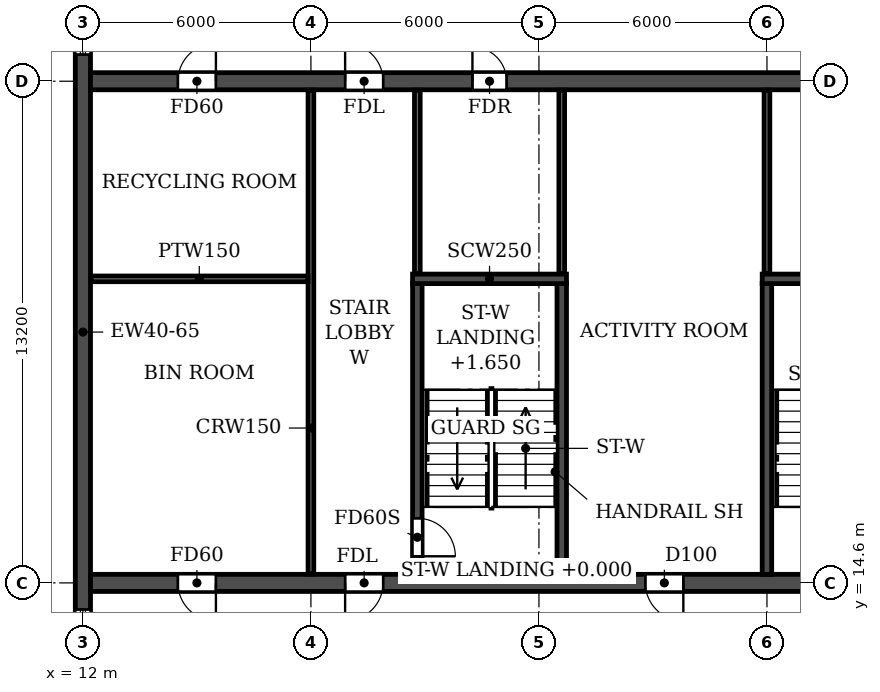
"""IFC4 building model, lengths in metres.
Left out: names, types, materials, properties, quantities, classifications, styles, units other than length and angle.
Written with IfcOpenShell. Run it as: python <this file> out.ifc"""

import sys

from ifc_helpers import new_model, si_unit, direction, frame, frame_2d, origin, place, context, subcontext, project, spatial, rectangle, extrude, element, fill, save


model = new_model("IFC4")
c1 = context("Model", 3, precision=1e-05, world=origin(), true_north=direction((0.0, 1.0)))
c2 = subcontext(c1, "Body", "Model", "MODEL_VIEW")
j1 = project(units=[si_unit("LENGTHUNIT", "METRE"), si_unit("PLANEANGLEUNIT", "RADIAN")], contexts=[c1])
p1 = place(None, origin())
s1 = spatial("IfcSite", under=j1, at=p1, CompositionType="ELEMENT")
p2 = place(p1, origin())
s2 = spatial("IfcBuilding", under=s1, at=p2, CompositionType="ELEMENT")
p3 = place(p2, frame((0.0, 0.0, 155.4)))
s3 = spatial("IfcBuildingStorey", under=s2, at=p3, CompositionType="ELEMENT", Elevation=155.4)
p4 = place(p3, frame((12.0, 4.683, 0.0), z_axis=(0.0, 0.0, 1.0), x_axis=(0.0, 1.0, 0.0)))
e1 = element("IfcWall", 1, at=p4, inside=s3, PredefinedType="SHEAR", context=c2, shape_type="SweptSolid", body=[
    extrude(rectangle(XDim=33.034, YDim=0.4, at=frame_2d((16.517, 0.0))), origin(), (0.0, 0.0, 1.0), 3.0),
])
p5 = place(p4, frame((23.817, 0.0, 0.9)))
e2 = element("IfcOpeningElement", 2, at=p5, cuts=e1, PredefinedType="OPENING", context=c2, shape_type="SweptSolid", body=[
    extrude(rectangle(XDim=1.2, YDim=1.5, at=frame_2d((0.6, 0.75))), frame((0.0, 0.21, 0.0), z_axis=(0.0, -1.0, 0.0), x_axis=(1.0, 0.0, 0.0)), (0.0, 0.0, 1.0), 0.42),
])
p6 = place(p4, frame((8.017, 0.0, 0.9)))
e3 = element("IfcOpeningElement", 3, at=p6, cuts=e1, PredefinedType="OPENING", context=c2, shape_type="SweptSolid", body=[
    extrude(rectangle(XDim=1.2, YDim=1.5, at=frame_2d((0.6, 0.75))), frame((0.0, 0.21, 0.0), z_axis=(0.0, -1.0, 0.0), x_axis=(1.0, 0.0, 0.0)), (0.0, 0.0, 1.0), 0.42),
])
p7 = place(p4, frame((28.293, 0.0, 0.6)))
e4 = element("IfcOpeningElement", 4, at=p7, cuts=e1, PredefinedType="OPENING", context=c2, shape_type="SweptSolid", body=[
    extrude(rectangle(XDim=2.2, YDim=1.8, at=frame_2d((1.1, 0.9))), frame((0.0, 0.21, 0.0), z_axis=(0.0, -1.0, 0.0), x_axis=(1.0, 0.0, 0.0)), (0.0, 0.0, 1.0), 0.42),
])
p8 = place(p4, frame((2.541, 0.0, 0.6)))
e5 = element("IfcOpeningElement", 5, at=p8, cuts=e1, PredefinedType="OPENING", context=c2, shape_type="SweptSolid", body=[
    extrude(rectangle(XDim=2.2, YDim=1.8, at=frame_2d((1.1, 0.9))), frame((0.0, 0.21, 0.0), z_axis=(0.0, -1.0, 0.0), x_axis=(1.0, 0.0, 0.0)), (0.0, 0.0, 1.0), 0.42),
])
p9 = place(p3, frame((12.2, 14.6, 0.0), z_axis=(0.0, 0.0, 1.0), x_axis=(1.0, 0.0, 0.0)))
e6 = element("IfcWall", 6, at=p9, inside=s3, PredefinedType="SOLIDWALL", context=c2, shape_type="SweptSolid", body=[
    extrude(rectangle(XDim=77.6, YDim=0.45, at=frame_2d((38.8, 0.0))), origin(), (0.0, 0.0, 1.0), 3.0),
])
p10 = place(p9, frame((2.3, 0.0, 0.0)))
e7 = element("IfcOpeningElement", 7, at=p10, cuts=e6, PredefinedType="OPENING", context=c2, shape_type="SweptSolid", body=[
    extrude(rectangle(XDim=1.0, YDim=2.1, at=frame_2d((0.5, 1.05))), frame((0.0, 0.235, 0.0), z_axis=(0.0, -1.0, 0.0), x_axis=(1.0, 0.0, 0.0)), (0.0, 0.0, 1.0), 0.47),
])
p11 = place(p9, frame((6.7, 0.0, 0.0)))
e8 = element("IfcOpeningElement", 8, at=p11, cuts=e6, PredefinedType="OPENING", context=c2, shape_type="SweptSolid", body=[
    extrude(rectangle(XDim=1.0, YDim=2.1, at=frame_2d((0.5, 1.05))), frame((0.0, 0.235, 0.0), z_axis=(0.0, -1.0, 0.0), x_axis=(1.0, 0.0, 0.0)), (0.0, 0.0, 1.0), 0.47),
])
p12 = place(p9, frame((14.6, 0.0, 0.0)))
e9 = element("IfcOpeningElement", 9, at=p12, cuts=e6, PredefinedType="OPENING", context=c2, shape_type="SweptSolid", body=[
    extrude(rectangle(XDim=1.0, YDim=2.1, at=frame_2d((0.5, 1.05))), frame((0.0, 0.235, 0.0), z_axis=(0.0, -1.0, 0.0), x_axis=(1.0, 0.0, 0.0)), (0.0, 0.0, 1.0), 0.47),
])
p13 = place(p9, frame((19.2, 0.0, 0.0)))
e10 = element("IfcOpeningElement", 10, at=p13, cuts=e6, PredefinedType="OPENING", context=c2, shape_type="SweptSolid", body=[
    extrude(rectangle(XDim=1.0, YDim=2.1, at=frame_2d((0.5, 1.05))), frame((0.0, 0.235, 0.0), z_axis=(0.0, -1.0, 0.0), x_axis=(1.0, 0.0, 0.0)), (0.0, 0.0, 1.0), 0.47),
])
p14 = place(p9, frame((30.5, 0.0, 0.0)))
e11 = element("IfcOpeningElement", 11, at=p14, cuts=e6, PredefinedType="OPENING", context=c2, shape_type="SweptSolid", body=[
    extrude(rectangle(XDim=1.0, YDim=2.1, at=frame_2d((0.5, 1.05))), frame((0.0, 0.235, 0.0), z_axis=(0.0, -1.0, 0.0), x_axis=(1.0, 0.0, 0.0)), (0.0, 0.0, 1.0), 0.47),
])
p15 = place(p9, frame((34.15, 0.0, 0.0)))
e12 = element("IfcOpeningElement", 12, at=p15, cuts=e6, PredefinedType="OPENING", context=c2, shape_type="SweptSolid", body=[
    extrude(rectangle(XDim=1.5, YDim=2.1, at=frame_2d((0.75, 1.05))), frame((0.0, 0.235, 0.0), z_axis=(0.0, -1.0, 0.0), x_axis=(1.0, 0.0, 0.0)), (0.0, 0.0, 1.0), 0.47),
])
p16 = place(p9, frame((38.3, 0.0, 0.0)))
e13 = element("IfcOpeningElement", 13, at=p16, cuts=e6, PredefinedType="OPENING", context=c2, shape_type="SweptSolid", body=[
    extrude(rectangle(XDim=1.0, YDim=2.1, at=frame_2d((0.5, 1.05))), frame((0.0, 0.235, 0.0), z_axis=(0.0, -1.0, 0.0), x_axis=(1.0, 0.0, 0.0)), (0.0, 0.0, 1.0), 0.47),
])
p17 = place(p9, frame((43.5, 0.0, 0.0)))
e14 = element("IfcOpeningElement", 14, at=p17, cuts=e6, PredefinedType="OPENING", context=c2, shape_type="SweptSolid", body=[
    extrude(rectangle(XDim=1.0, YDim=2.1, at=frame_2d((0.5, 1.05))), frame((0.0, 0.235, 0.0), z_axis=(0.0, -1.0, 0.0), x_axis=(1.0, 0.0, 0.0)), (0.0, 0.0, 1.0), 0.47),
])
p18 = place(p9, frame((57.4, 0.0, 0.0)))
e15 = element("IfcOpeningElement", 15, at=p18, cuts=e6, PredefinedType="OPENING", context=c2, shape_type="SweptSolid", body=[
    extrude(rectangle(XDim=1.0, YDim=2.1, at=frame_2d((0.5, 1.05))), frame((0.0, 0.235, 0.0), z_axis=(0.0, -1.0, 0.0), x_axis=(1.0, 0.0, 0.0)), (0.0, 0.0, 1.0), 0.47),
])
p19 = place(p9, frame((62.0, 0.0, 0.0)))
e16 = element("IfcOpeningElement", 16, at=p19, cuts=e6, PredefinedType="OPENING", context=c2, shape_type="SweptSolid", body=[
    extrude(rectangle(XDim=1.0, YDim=2.1, at=frame_2d((0.5, 1.05))), frame((0.0, 0.235, 0.0), z_axis=(0.0, -1.0, 0.0), x_axis=(1.0, 0.0, 0.0)), (0.0, 0.0, 1.0), 0.47),
])
p20 = place(p9, frame((69.9, 0.0, 0.0)))
e17 = element("IfcOpeningElement", 17, at=p20, cuts=e6, PredefinedType="OPENING", context=c2, shape_type="SweptSolid", body=[
    extrude(rectangle(XDim=1.0, YDim=2.1, at=frame_2d((0.5, 1.05))), frame((0.0, 0.235, 0.0), z_axis=(0.0, -1.0, 0.0), x_axis=(1.0, 0.0, 0.0)), (0.0, 0.0, 1.0), 0.47),
])
p21 = place(p9, frame((74.3, 0.0, 0.0)))
e18 = element("IfcOpeningElement", 18, at=p21, cuts=e6, PredefinedType="OPENING", context=c2, shape_type="SweptSolid", body=[
    extrude(rectangle(XDim=1.0, YDim=2.1, at=frame_2d((0.5, 1.05))), frame((0.0, 0.235, 0.0), z_axis=(0.0, -1.0, 0.0), x_axis=(1.0, 0.0, 0.0)), (0.0, 0.0, 1.0), 0.47),
])
p22 = place(p3, frame((12.2, 27.8, 0.0), z_axis=(0.0, 0.0, 1.0), x_axis=(1.0, 0.0, 0.0)))
e19 = element("IfcWall", 19, at=p22, inside=s3, PredefinedType="SOLIDWALL", context=c2, shape_type="SweptSolid", body=[
    extrude(rectangle(XDim=77.6, YDim=0.45, at=frame_2d((38.8, 0.0))), origin(), (0.0, 0.0, 1.0), 3.0),
])
p23 = place(p22, frame((2.3, 0.0, 0.0)))
e20 = element("IfcOpeningElement", 20, at=p23, cuts=e19, PredefinedType="OPENING", context=c2, shape_type="SweptSolid", body=[
    extrude(rectangle(XDim=1.0, YDim=2.1, at=frame_2d((0.5, 1.05))), frame((0.0, 0.235, 0.0), z_axis=(0.0, -1.0, 0.0), x_axis=(1.0, 0.0, 0.0)), (0.0, 0.0, 1.0), 0.47),
])
p24 = place(p22, frame((6.7, 0.0, 0.0)))
e21 = element("IfcOpeningElement", 21, at=p24, cuts=e19, PredefinedType="OPENING", context=c2, shape_type="SweptSolid", body=[
    extrude(rectangle(XDim=1.0, YDim=2.1, at=frame_2d((0.5, 1.05))), frame((0.0, 0.235, 0.0), z_axis=(0.0, -1.0, 0.0), x_axis=(1.0, 0.0, 0.0)), (0.0, 0.0, 1.0), 0.47),
])
p25 = place(p22, frame((10.05, 0.0, 0.0)))
e22 = element("IfcOpeningElement", 22, at=p25, cuts=e19, PredefinedType="OPENING", context=c2, shape_type="SweptSolid", body=[
    extrude(rectangle(XDim=0.9, YDim=2.1, at=frame_2d((0.45, 1.05))), frame((0.0, 0.235, 0.0), z_axis=(0.0, -1.0, 0.0), x_axis=(1.0, 0.0, 0.0)), (0.0, 0.0, 1.0), 0.47),
])
p26 = place(p22, frame((19.25, 0.0, 0.0)))
e23 = element("IfcOpeningElement", 23, at=p26, cuts=e19, PredefinedType="OPENING", context=c2, shape_type="SweptSolid", body=[
    extrude(rectangle(XDim=0.9, YDim=2.1, at=frame_2d((0.45, 1.05))), frame((0.0, 0.235, 0.0), z_axis=(0.0, -1.0, 0.0), x_axis=(1.0, 0.0, 0.0)), (0.0, 0.0, 1.0), 0.47),
])
p27 = place(p22, frame((22.4, 0.0, 0.0)))
e24 = element("IfcOpeningElement", 24, at=p27, cuts=e19, PredefinedType="OPENING", context=c2, shape_type="SweptSolid", body=[
    extrude(rectangle(XDim=1.0, YDim=2.1, at=frame_2d((0.5, 1.05))), frame((0.0, 0.235, 0.0), z_axis=(0.0, -1.0, 0.0), x_axis=(1.0, 0.0, 0.0)), (0.0, 0.0, 1.0), 0.47),
])
p28 = place(p22, frame((27.6, 0.0, 0.0)))
e25 = element("IfcOpeningElement", 25, at=p28, cuts=e19, PredefinedType="OPENING", context=c2, shape_type="SweptSolid", body=[
    extrude(rectangle(XDim=1.0, YDim=2.1, at=frame_2d((0.5, 1.05))), frame((0.0, 0.235, 0.0), z_axis=(0.0, -1.0, 0.0), x_axis=(1.0, 0.0, 0.0)), (0.0, 0.0, 1.0), 0.47),
])
p29 = place(p22, frame((35.4, 0.0, 0.0)))
e26 = element("IfcOpeningElement", 26, at=p29, cuts=e19, PredefinedType="OPENING", context=c2, shape_type="SweptSolid", body=[
    extrude(rectangle(XDim=1.0, YDim=2.1, at=frame_2d((0.5, 1.05))), frame((0.0, 0.235, 0.0), z_axis=(0.0, -1.0, 0.0), x_axis=(1.0, 0.0, 0.0)), (0.0, 0.0, 1.0), 0.47),
])
p30 = place(p22, frame((38.3, 0.0, 0.0)))
e27 = element("IfcOpeningElement", 27, at=p30, cuts=e19, PredefinedType="OPENING", context=c2, shape_type="SweptSolid", body=[
    extrude(rectangle(XDim=1.0, YDim=2.1, at=frame_2d((0.5, 1.05))), frame((0.0, 0.235, 0.0), z_axis=(0.0, -1.0, 0.0), x_axis=(1.0, 0.0, 0.0)), (0.0, 0.0, 1.0), 0.47),
])
p31 = place(p22, frame((42.25, 0.0, 0.0)))
e28 = element("IfcOpeningElement", 28, at=p31, cuts=e19, PredefinedType="OPENING", context=c2, shape_type="SweptSolid", body=[
    extrude(rectangle(XDim=1.5, YDim=2.1, at=frame_2d((0.75, 1.05))), frame((0.0, 0.235, 0.0), z_axis=(0.0, -1.0, 0.0), x_axis=(1.0, 0.0, 0.0)), (0.0, 0.0, 1.0), 0.47),
])
p32 = place(p22, frame((47.7, 0.0, 0.0)))
e29 = element("IfcOpeningElement", 29, at=p32, cuts=e19, PredefinedType="OPENING", context=c2, shape_type="SweptSolid", body=[
    extrude(rectangle(XDim=1.0, YDim=2.1, at=frame_2d((0.5, 1.05))), frame((0.0, 0.235, 0.0), z_axis=(0.0, -1.0, 0.0), x_axis=(1.0, 0.0, 0.0)), (0.0, 0.0, 1.0), 0.47),
])
p33 = place(p22, frame((51.6, 0.0, 0.0)))
e30 = element("IfcOpeningElement", 30, at=p33, cuts=e19, PredefinedType="OPENING", context=c2, shape_type="SweptSolid", body=[
    extrude(rectangle(XDim=1.0, YDim=2.1, at=frame_2d((0.5, 1.05))), frame((0.0, 0.235, 0.0), z_axis=(0.0, -1.0, 0.0), x_axis=(1.0, 0.0, 0.0)), (0.0, 0.0, 1.0), 0.47),
])
p34 = place(p22, frame((54.2, 0.0, 0.0)))
e31 = element("IfcOpeningElement", 31, at=p34, cuts=e19, PredefinedType="OPENING", context=c2, shape_type="SweptSolid", body=[
    extrude(rectangle(XDim=1.0, YDim=2.1, at=frame_2d((0.5, 1.05))), frame((0.0, 0.235, 0.0), z_axis=(0.0, -1.0, 0.0), x_axis=(1.0, 0.0, 0.0)), (0.0, 0.0, 1.0), 0.47),
])
p35 = place(p22, frame((57.45, 0.0, 0.0)))
e32 = element("IfcOpeningElement", 32, at=p35, cuts=e19, PredefinedType="OPENING", context=c2, shape_type="SweptSolid", body=[
    extrude(rectangle(XDim=0.9, YDim=2.1, at=frame_2d((0.45, 1.05))), frame((0.0, 0.235, 0.0), z_axis=(0.0, -1.0, 0.0), x_axis=(1.0, 0.0, 0.0)), (0.0, 0.0, 1.0), 0.47),
])
p36 = place(p22, frame((66.65, 0.0, 0.0)))
e33 = element("IfcOpeningElement", 33, at=p36, cuts=e19, PredefinedType="OPENING", context=c2, shape_type="SweptSolid", body=[
    extrude(rectangle(XDim=0.9, YDim=2.1, at=frame_2d((0.45, 1.05))), frame((0.0, 0.235, 0.0), z_axis=(0.0, -1.0, 0.0), x_axis=(1.0, 0.0, 0.0)), (0.0, 0.0, 1.0), 0.47),
])
p37 = place(p22, frame((69.9, 0.0, 0.0)))
e34 = element("IfcOpeningElement", 34, at=p37, cuts=e19, PredefinedType="OPENING", context=c2, shape_type="SweptSolid", body=[
    extrude(rectangle(XDim=1.0, YDim=2.1, at=frame_2d((0.5, 1.05))), frame((0.0, 0.235, 0.0), z_axis=(0.0, -1.0, 0.0), x_axis=(1.0, 0.0, 0.0)), (0.0, 0.0, 1.0), 0.47),
])
p38 = place(p22, frame((74.3, 0.0, 0.0)))
e35 = element("IfcOpeningElement", 35, at=p38, cuts=e19, PredefinedType="OPENING", context=c2, shape_type="SweptSolid", body=[
    extrude(rectangle(XDim=1.0, YDim=2.1, at=frame_2d((0.5, 1.05))), frame((0.0, 0.235, 0.0), z_axis=(0.0, -1.0, 0.0), x_axis=(1.0, 0.0, 0.0)), (0.0, 0.0, 1.0), 0.47),
])
p39 = place(p3, frame((30.0, 14.825, 0.0), z_axis=(0.0, 0.0, 1.0), x_axis=(0.0, 1.0, 0.0)))
e36 = element("IfcWall", 36, at=p39, inside=s3, PredefinedType="SOLIDWALL", context=c2, shape_type="SweptSolid", body=[
    extrude(rectangle(XDim=7.65, YDim=0.25, at=frame_2d((3.825, 0.0))), origin(), (0.0, 0.0, 1.0), 3.0),
])
p40 = place(p3, frame((29.875, 22.6, 0.0), z_axis=(0.0, 0.0, 1.0), x_axis=(1.0, 0.0, 0.0)))
e37 = element("IfcWall", 37, at=p40, inside=s3, PredefinedType="SOLIDWALL", context=c2, shape_type="SweptSolid", body=[
    extrude(rectangle(XDim=4.05, YDim=0.25, at=frame_2d((2.025, 0.0))), origin(), (0.0, 0.0, 1.0), 3.0),
])
p41 = place(p3, frame((20.8, 14.825, 0.0), z_axis=(0.0, 0.0, 1.0), x_axis=(0.0, 1.0, 0.0)))
e38 = element("IfcWall", 38, at=p41, inside=s3, PredefinedType="SOLIDWALL", context=c2, shape_type="SweptSolid", body=[
    extrude(rectangle(XDim=7.65, YDim=0.25, at=frame_2d((3.825, 0.0))), origin(), (0.0, 0.0, 1.0), 3.0),
])
p42 = place(p41, frame((0.475, 0.0, 0.0)))
e39 = element("IfcOpeningElement", 39, at=p42, cuts=e38, PredefinedType="OPENING", context=c2, shape_type="SweptSolid", body=[
    extrude(rectangle(XDim=1.0, YDim=2.1, at=frame_2d((0.5, 1.05))), frame((0.0, 0.135, 0.0), z_axis=(0.0, -1.0, 0.0), x_axis=(1.0, 0.0, 0.0)), (0.0, 0.0, 1.0), 0.27),
])
p43 = place(p3, frame((24.6, 14.825, 0.0), z_axis=(0.0, 0.0, 1.0), x_axis=(0.0, 1.0, 0.0)))
e40 = element("IfcWall", 40, at=p43, inside=s3, PredefinedType="SOLIDWALL", context=c2, shape_type="SweptSolid", body=[
    extrude(rectangle(XDim=7.65, YDim=0.25, at=frame_2d((3.825, 0.0))), origin(), (0.0, 0.0, 1.0), 3.0),
])
p44 = place(p3, frame((20.675, 22.6, 0.0), z_axis=(0.0, 0.0, 1.0), x_axis=(1.0, 0.0, 0.0)))
e41 = element("IfcWall", 41, at=p44, inside=s3, PredefinedType="SOLIDWALL", context=c2, shape_type="SweptSolid", body=[
    extrude(rectangle(XDim=4.05, YDim=0.25, at=frame_2d((2.025, 0.0))), origin(), (0.0, 0.0, 1.0), 3.0),
])
p45 = place(p3, frame((18.0, 14.835, 0.0), z_axis=(0.0, 0.0, 1.0), x_axis=(0.0, 1.0, 0.0)))
e42 = element("IfcWall", 42, at=p45, inside=s3, PredefinedType="PARTITIONING", context=c2, shape_type="SweptSolid", body=[
    extrude(rectangle(XDim=12.73, YDim=0.15, at=frame_2d((6.365, 0.0))), origin(), (0.0, 0.0, 1.0), 3.0),
])
p46 = place(p3, frame((12.21, 22.6, 0.0), z_axis=(0.0, 0.0, 1.0), x_axis=(1.0, 0.0, 0.0)))
e43 = element("IfcWall", 43, at=p46, inside=s3, PredefinedType="PARTITIONING", context=c2, shape_type="SweptSolid", body=[
    extrude(rectangle(XDim=5.715, YDim=0.15, at=frame_2d((2.857, 0.0))), origin(), (0.0, 0.0, 1.0), 3.0),
])
for number, where, z_axis, x_axis in (
    (44, (20.8, 22.735, 0.0), (0.0, 0.0, 1.0), (0.0, 1.0, 0.0)),
    (45, (24.6, 22.735, 0.0), (0.0, 0.0, 1.0), (0.0, 1.0, 0.0)),
    (46, (30.0, 22.735, 0.0), (0.0, 0.0, 1.0), (0.0, 1.0, 0.0)),
):
    element("IfcWall", number, at=place(p3, frame(where, z_axis=z_axis, x_axis=x_axis)), inside=s3, PredefinedType="PARTITIONING", context=c2, shape_type="SweptSolid", body=[
        extrude(rectangle(XDim=4.83, YDim=0.15, at=frame_2d((2.415, 0.0))), origin(), (0.0, 0.0, 1.0), 3.0),
    ])
p47 = place(p5, origin())
e47 = element("IfcWindow", 47, at=p47, inside=s3, PartitioningType="SINGLE_PANEL", PredefinedType="WINDOW", context=c2, shape_type="SweptSolid", body=[
    extrude(rectangle(XDim=1.2, YDim=1.5, at=frame_2d((0.6, 0.75))), frame((0.0, 0.03, 0.0), z_axis=(0.0, -1.0, 0.0), x_axis=(1.0, 0.0, 0.0)), (0.0, 0.0, 1.0), 0.06),
])
fill(e2, e47)
p48 = place(p6, origin())
e48 = element("IfcWindow", 48, at=p48, inside=s3, PartitioningType="SINGLE_PANEL", PredefinedType="WINDOW", context=c2, shape_type="SweptSolid", body=[
    extrude(rectangle(XDim=1.2, YDim=1.5, at=frame_2d((0.6, 0.75))), frame((0.0, 0.03, 0.0), z_axis=(0.0, -1.0, 0.0), x_axis=(1.0, 0.0, 0.0)), (0.0, 0.0, 1.0), 0.06),
])
fill(e3, e48)
p49 = place(p23, origin())
e49 = element("IfcDoor", 49, at=p49, inside=s3, OperationType="SINGLE_SWING_RIGHT", PredefinedType="DOOR", context=c2, shape_type="SweptSolid", body=[
    extrude(rectangle(XDim=1.0, YDim=2.1, at=frame_2d((0.5, 1.05))), frame((0.0, 0.025, 0.0), z_axis=(0.0, -1.0, 0.0), x_axis=(1.0, 0.0, 0.0)), (0.0, 0.0, 1.0), 0.05),
])
fill(e20, e49)
p50 = place(p24, origin())
e50 = element("IfcDoor", 50, at=p50, inside=s3, OperationType="SINGLE_SWING_LEFT", PredefinedType="DOOR", context=c2, shape_type="SweptSolid", body=[
    extrude(rectangle(XDim=1.0, YDim=2.1, at=frame_2d((0.5, 1.05))), frame((0.0, 0.025, 0.0), z_axis=(0.0, -1.0, 0.0), x_axis=(1.0, 0.0, 0.0)), (0.0, 0.0, 1.0), 0.05),
])
fill(e21, e50)
p51 = place(p25, origin())
e51 = element("IfcDoor", 51, at=p51, inside=s3, OperationType="SINGLE_SWING_LEFT", PredefinedType="DOOR", context=c2, shape_type="SweptSolid", body=[
    extrude(rectangle(XDim=0.9, YDim=2.1, at=frame_2d((0.45, 1.05))), frame((0.0, 0.025, 0.0), z_axis=(0.0, -1.0, 0.0), x_axis=(1.0, 0.0, 0.0)), (0.0, 0.0, 1.0), 0.05),
])
fill(e22, e51)
p52 = place(p10, frame((1.0, 0.0, 0.0), z_axis=(0.0, 0.0, 1.0), x_axis=(-1.0, 0.0, 0.0)))
e52 = element("IfcDoor", 52, at=p52, inside=s3, OperationType="SINGLE_SWING_LEFT", PredefinedType="DOOR", context=c2, shape_type="SweptSolid", body=[
    extrude(rectangle(XDim=1.0, YDim=2.1, at=frame_2d((0.5, 1.05))), frame((0.0, 0.025, 0.0), z_axis=(0.0, -1.0, 0.0), x_axis=(1.0, 0.0, 0.0)), (0.0, 0.0, 1.0), 0.05),
])
fill(e7, e52)
p53 = place(p11, frame((1.0, 0.0, 0.0), z_axis=(0.0, 0.0, 1.0), x_axis=(-1.0, 0.0, 0.0)))
e53 = element("IfcDoor", 53, at=p53, inside=s3, OperationType="SINGLE_SWING_RIGHT", PredefinedType="DOOR", context=c2, shape_type="SweptSolid", body=[
    extrude(rectangle(XDim=1.0, YDim=2.1, at=frame_2d((0.5, 1.05))), frame((0.0, 0.025, 0.0), z_axis=(0.0, -1.0, 0.0), x_axis=(1.0, 0.0, 0.0)), (0.0, 0.0, 1.0), 0.05),
])
fill(e8, e53)
p54 = place(p12, frame((1.0, 0.0, 0.0), z_axis=(0.0, 0.0, 1.0), x_axis=(-1.0, 0.0, 0.0)))
e54 = element("IfcDoor", 54, at=p54, inside=s3, OperationType="SINGLE_SWING_LEFT", PredefinedType="DOOR", context=c2, shape_type="SweptSolid", body=[
    extrude(rectangle(XDim=1.0, YDim=2.1, at=frame_2d((0.5, 1.05))), frame((0.0, 0.025, 0.0), z_axis=(0.0, -1.0, 0.0), x_axis=(1.0, 0.0, 0.0)), (0.0, 0.0, 1.0), 0.05),
])
fill(e9, e54)
p55 = place(p42, frame((1.0, 0.0, 0.0), z_axis=(0.0, 0.0, 1.0), x_axis=(-1.0, 0.0, 0.0)))
e55 = element("IfcDoor", 55, at=p55, inside=s3, OperationType="SINGLE_SWING_RIGHT", PredefinedType="DOOR", context=c2, shape_type="SweptSolid", body=[
    extrude(rectangle(XDim=1.0, YDim=2.1, at=frame_2d((0.5, 1.05))), frame((0.0, 0.025, 0.0), z_axis=(0.0, -1.0, 0.0), x_axis=(1.0, 0.0, 0.0)), (0.0, 0.0, 1.0), 0.05),
])
fill(e39, e55)
save(model, sys.argv[1])
